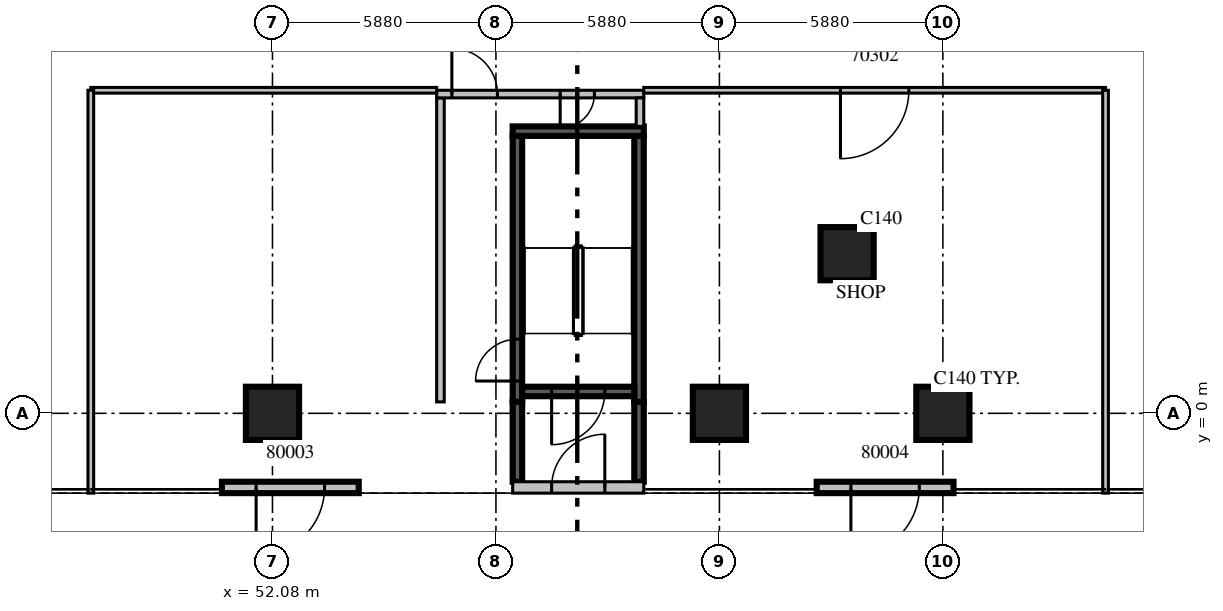
"""IFC4 building model, lengths in metres.
Left out: names, types, materials, properties, quantities, classifications, styles, units other than length and angle.
Written with IfcOpenShell. Run it as: python <this file> out.ifc"""

import sys

from ifc_helpers import new_model, si_unit, direction, frame, frame_2d, origin, origin_2d, place, context, subcontext, project, spatial, rectangle, extrude, source, transform, mapped, element, fill, save


model = new_model("IFC4")
c1 = context("Model", 3, precision=1e-05, world=origin(), true_north=direction((0.0, 1.0)))
c2 = subcontext(c1, "Body", "Model", "MODEL_VIEW")
j1 = project(units=[si_unit("LENGTHUNIT", "METRE"), si_unit("PLANEANGLEUNIT", "RADIAN")], contexts=[c1])
p1 = place(None, origin())
s1 = spatial("IfcSite", under=j1, at=p1, CompositionType="ELEMENT")
p2 = place(p1, origin())
s2 = spatial("IfcBuilding", under=s1, at=p2, CompositionType="ELEMENT")
p3 = place(p2, origin())
s3 = spatial("IfcBuildingStorey", under=s2, at=p3, CompositionType="ELEMENT", Elevation=0.0)
m1 = source(origin(), c2, "Body", "SweptSolid", [
    extrude(rectangle(XDim=1.4, YDim=1.4, at=origin_2d()), origin(), (0.0, 0.0, 1.0), 7.5),
])
for number, where, z_axis, x_axis in (
    (1, (52.08, 0.0, 0.0), (0.0, 0.0, 1.0), (1.0, 0.0, 0.0)),
    (2, (63.84, 0.0, 0.0), (0.0, 0.0, 1.0), (1.0, 0.0, 0.0)),
    (3, (67.2, 4.2, 0.0), (0.0, 0.0, 1.0), (1.0, 0.0, 0.0)),
    (4, (69.72, 0.0, 0.0), (0.0, 0.0, 1.0), (1.0, 0.0, 0.0)),
):
    element("IfcColumn", number, at=place(p3, frame(where, z_axis=z_axis, x_axis=x_axis)), inside=s3, PredefinedType="COLUMN", context=c2, shape_type="MappedRepresentation", body=[
        mapped(m1, transform((0.0, 0.0, 0.0), scale=1.0)),
    ])
m2 = source(origin(), c2, "Body", "SweptSolid", [
    extrude(rectangle(XDim=3.6, YDim=0.3, at=frame_2d((1.8, 0.0))), origin(), (0.0, 0.0, 1.0), 6.9),
])
p4 = place(p3, frame((50.75, -1.95, 0.0), z_axis=(0.0, 0.0, 1.0), x_axis=(1.0, 0.0, 0.0)))
e5 = element("IfcWall", 5, at=p4, inside=s3, PredefinedType="STANDARD", context=c2, shape_type="MappedRepresentation", body=[
    mapped(m2, transform((0.0, 0.0, 0.0), scale=1.0)),
])
m3 = source(origin(), c2, "Body", "SweptSolid", [
    extrude(rectangle(XDim=1.8, YDim=2.4, at=frame_2d((0.9, 1.2))), frame((0.0, 0.16, 0.0), z_axis=(0.0, -1.0, 0.0), x_axis=(1.0, 0.0, 0.0)), (0.0, 0.0, 1.0), 0.32),
])
p5 = place(p4, frame((0.9, 0.0, 0.0)))
e6 = element("IfcOpeningElement", 6, at=p5, cuts=e5, PredefinedType="OPENING", context=c2, shape_type="MappedRepresentation", body=[
    mapped(m3, transform((0.0, 0.0, 0.0), scale=1.0)),
])
p6 = place(p3, frame((66.4, -1.95, 0.0), z_axis=(0.0, 0.0, 1.0), x_axis=(1.0, 0.0, 0.0)))
e7 = element("IfcWall", 7, at=p6, inside=s3, PredefinedType="STANDARD", context=c2, shape_type="MappedRepresentation", body=[
    mapped(m2, transform((0.0, 0.0, 0.0), scale=1.0)),
])
p7 = place(p6, frame((0.9, 0.0, 0.0)))
e8 = element("IfcOpeningElement", 8, at=p7, cuts=e7, PredefinedType="OPENING", context=c2, shape_type="MappedRepresentation", body=[
    mapped(m3, transform((0.0, 0.0, 0.0), scale=1.0)),
])
m4 = source(origin(), c2, "Body", "SweptSolid", [
    extrude(rectangle(XDim=7.0, YDim=0.25, at=frame_2d((3.5, 0.0))), origin(), (0.0, 0.0, 1.0), 6.9),
])
p8 = place(p3, frame((58.525, 0.3, 0.0), z_axis=(0.0, 0.0, 1.0), x_axis=(0.0, 1.0, 0.0)))
e9 = element("IfcWall", 9, at=p8, inside=s3, PredefinedType="SOLIDWALL", context=c2, shape_type="MappedRepresentation", body=[
    mapped(m4, transform((0.0, 0.0, 0.0), scale=1.0)),
])
m5 = source(origin(), c2, "Body", "SweptSolid", [
    extrude(rectangle(XDim=1.1, YDim=2.1, at=frame_2d((0.55, 1.05))), frame((0.0, 0.135, 0.0), z_axis=(0.0, -1.0, 0.0), x_axis=(1.0, 0.0, 0.0)), (0.0, 0.0, 1.0), 0.27),
])
p9 = place(p8, frame((0.55, 0.0, 0.0)))
e10 = element("IfcOpeningElement", 10, at=p9, cuts=e9, PredefinedType="OPENING", context=c2, shape_type="MappedRepresentation", body=[
    mapped(m5, transform((0.0, 0.0, 0.0), scale=1.0)),
])
p10 = place(p3, frame((61.725, 0.3, 0.0), z_axis=(0.0, 0.0, 1.0), x_axis=(0.0, 1.0, 0.0)))
e11 = element("IfcWall", 11, at=p10, inside=s3, PredefinedType="SOLIDWALL", context=c2, shape_type="MappedRepresentation", body=[
    mapped(m4, transform((0.0, 0.0, 0.0), scale=1.0)),
])
m6 = source(origin(), c2, "Body", "SweptSolid", [
    extrude(rectangle(XDim=3.45, YDim=0.25, at=frame_2d((1.725, 0.0))), origin(), (0.0, 0.0, 1.0), 6.9),
])
p11 = place(p3, frame((58.4, 7.425, 0.0), z_axis=(0.0, 0.0, 1.0), x_axis=(1.0, 0.0, 0.0)))
e12 = element("IfcWall", 12, at=p11, inside=s3, PredefinedType="SOLIDWALL", context=c2, shape_type="MappedRepresentation", body=[
    mapped(m6, transform((0.0, 0.0, 0.0), scale=1.0)),
])
m7 = source(origin(), c2, "Body", "SweptSolid", [
    extrude(rectangle(XDim=2.95, YDim=0.25, at=frame_2d((1.475, 0.0))), origin(), (0.0, 0.0, 1.0), 6.9),
])
p12 = place(p3, frame((58.65, 0.575, 0.0), z_axis=(0.0, 0.0, 1.0), x_axis=(1.0, 0.0, 0.0)))
e13 = element("IfcWall", 13, at=p12, inside=s3, PredefinedType="SOLIDWALL", context=c2, shape_type="MappedRepresentation", body=[
    mapped(m7, transform((0.0, 0.0, 0.0), scale=1.0)),
])
m8 = source(origin(), c2, "Body", "SweptSolid", [
    extrude(rectangle(XDim=1.4, YDim=2.1, at=frame_2d((0.7, 1.05))), frame((0.0, 0.135, 0.0), z_axis=(0.0, -1.0, 0.0), x_axis=(1.0, 0.0, 0.0)), (0.0, 0.0, 1.0), 0.27),
])
p13 = place(p12, frame((0.775, 0.0, 0.0)))
e14 = element("IfcOpeningElement", 14, at=p13, cuts=e13, PredefinedType="OPENING", context=c2, shape_type="MappedRepresentation", body=[
    mapped(m8, transform((0.0, 0.0, 0.0), scale=1.0)),
])
m9 = source(origin(), c2, "Body", "SweptSolid", [
    extrude(rectangle(XDim=8.0, YDim=0.2, at=frame_2d((4.0, 0.0))), origin(), (0.0, 0.0, 1.0), 6.9),
])
p14 = place(p3, frame((56.5, 0.3, 0.0), z_axis=(0.0, 0.0, 1.0), x_axis=(0.0, 1.0, 0.0)))
e15 = element("IfcWall", 15, at=p14, inside=s3, PredefinedType="PARTITIONING", context=c2, shape_type="MappedRepresentation", body=[
    mapped(m9, transform((0.0, 0.0, 0.0), scale=1.0)),
])
m10 = source(origin(), c2, "Body", "SweptSolid", [
    extrude(rectangle(XDim=5.45, YDim=0.2, at=frame_2d((2.725, 0.0))), origin(), (0.0, 0.0, 1.0), 6.9),
])
p15 = place(p3, frame((56.4, 8.4, 0.0), z_axis=(0.0, 0.0, 1.0), x_axis=(1.0, 0.0, 0.0)))
e16 = element("IfcWall", 16, at=p15, inside=s3, PredefinedType="PARTITIONING", context=c2, shape_type="MappedRepresentation", body=[
    mapped(m10, transform((0.0, 0.0, 0.0), scale=1.0)),
])
m11 = source(origin(), c2, "Body", "SweptSolid", [
    extrude(rectangle(XDim=1.2, YDim=2.1, at=frame_2d((0.6, 1.05))), frame((0.0, 0.11, 0.0), z_axis=(0.0, -1.0, 0.0), x_axis=(1.0, 0.0, 0.0)), (0.0, 0.0, 1.0), 0.22),
])
p16 = place(p15, frame((0.4, 0.0, 0.0)))
e17 = element("IfcOpeningElement", 17, at=p16, cuts=e16, PredefinedType="OPENING", context=c2, shape_type="MappedRepresentation", body=[
    mapped(m11, transform((0.0, 0.0, 0.0), scale=1.0)),
])
m12 = source(origin(), c2, "Body", "SweptSolid", [
    extrude(rectangle(XDim=0.9, YDim=2.1, at=frame_2d((0.45, 1.05))), frame((0.0, 0.11, 0.0), z_axis=(0.0, -1.0, 0.0), x_axis=(1.0, 0.0, 0.0)), (0.0, 0.0, 1.0), 0.22),
])
p17 = place(p15, frame((3.25, 0.0, 0.0)))
e18 = element("IfcOpeningElement", 18, at=p17, cuts=e16, PredefinedType="OPENING", context=c2, shape_type="MappedRepresentation", body=[
    mapped(m12, transform((0.0, 0.0, 0.0), scale=1.0)),
])
m13 = source(origin(), c2, "Body", "SweptSolid", [
    extrude(rectangle(XDim=0.75, YDim=0.2, at=frame_2d((0.375, 0.0))), origin(), (0.0, 0.0, 1.0), 6.9),
])
p18 = place(p3, frame((61.75, 7.55, 0.0), z_axis=(0.0, 0.0, 1.0), x_axis=(0.0, 1.0, 0.0)))
e19 = element("IfcWall", 19, at=p18, inside=s3, PredefinedType="PARTITIONING", context=c2, shape_type="MappedRepresentation", body=[
    mapped(m13, transform((0.0, 0.0, 0.0), scale=1.0)),
])
m14 = source(origin(), c2, "Body", "SweptSolid", [
    extrude(rectangle(XDim=2.1, YDim=0.25, at=frame_2d((1.05, 0.0))), origin(), (0.0, 0.0, 1.0), 6.9),
])
for number, where, z_axis, x_axis in (
    (20, (58.525, -1.8, 0.0), (0.0, 0.0, 1.0), (0.0, 1.0, 0.0)),
    (21, (61.725, -1.8, 0.0), (0.0, 0.0, 1.0), (0.0, 1.0, 0.0)),
):
    element("IfcWall", number, at=place(p3, frame(where, z_axis=z_axis, x_axis=x_axis)), inside=s3, PredefinedType="SOLIDWALL", context=c2, shape_type="MappedRepresentation", body=[
        mapped(m14, transform((0.0, 0.0, 0.0), scale=1.0)),
    ])
m15 = source(origin(), c2, "Body", "SweptSolid", [
    extrude(rectangle(XDim=3.45, YDim=0.3, at=frame_2d((1.725, 0.0))), origin(), (0.0, 0.0, 1.0), 6.9),
])
p19 = place(p3, frame((61.85, -1.95, 0.0), z_axis=(0.0, 0.0, 1.0), x_axis=(-1.0, 0.0, 0.0)))
e22 = element("IfcWall", 22, at=p19, inside=s3, PredefinedType="PARTITIONING", context=c2, shape_type="MappedRepresentation", body=[
    mapped(m15, transform((0.0, 0.0, 0.0), scale=1.0)),
])
m16 = source(origin(), c2, "Body", "SweptSolid", [
    extrude(rectangle(XDim=1.4, YDim=2.1, at=frame_2d((0.7, 1.05))), frame((0.0, 0.16, 0.0), z_axis=(0.0, -1.0, 0.0), x_axis=(1.0, 0.0, 0.0)), (0.0, 0.0, 1.0), 0.32),
])
p20 = place(p19, frame((1.025, 0.0, 0.0)))
e23 = element("IfcOpeningElement", 23, at=p20, cuts=e22, PredefinedType="OPENING", context=c2, shape_type="MappedRepresentation", body=[
    mapped(m16, transform((0.0, 0.0, 0.0), scale=1.0)),
])
p21 = place(p3, frame((47.3, 8.5, 0.0), z_axis=(0.0, 0.0, 1.0), x_axis=(1.0, 0.0, 0.0)))
e24 = element("IfcWall", 24, at=p21, inside=s3, PredefinedType="PARTITIONING", context=c2, shape_type="SweptSolid", body=[
    extrude(rectangle(XDim=9.1, YDim=0.15, at=frame_2d((4.55, 0.0))), origin(), (0.0, 0.0, 1.0), 6.9),
])
p22 = place(p3, frame((61.85, 8.5, 0.0), z_axis=(0.0, 0.0, 1.0), x_axis=(1.0, 0.0, 0.0)))
e25 = element("IfcWall", 25, at=p22, inside=s3, PredefinedType="PARTITIONING", context=c2, shape_type="SweptSolid", body=[
    extrude(rectangle(XDim=12.15, YDim=0.15, at=frame_2d((6.075, 0.0))), origin(), (0.0, 0.0, 1.0), 6.9),
])
m17 = source(origin(), c2, "Body", "SweptSolid", [
    extrude(rectangle(XDim=1.8, YDim=2.1, at=frame_2d((0.9, 1.05))), frame((0.0, 0.085, 0.0), z_axis=(0.0, -1.0, 0.0), x_axis=(1.0, 0.0, 0.0)), (0.0, 0.0, 1.0), 0.17),
])
p23 = place(p22, frame((5.175, 0.0, 0.0)))
e26 = element("IfcOpeningElement", 26, at=p23, cuts=e25, PredefinedType="OPENING", context=c2, shape_type="MappedRepresentation", body=[
    mapped(m17, transform((0.0, 0.0, 0.0), scale=1.0)),
])
m18 = source(origin(), c2, "Body", "SweptSolid", [
    extrude(rectangle(XDim=10.6, YDim=0.15, at=frame_2d((5.3, 0.0))), origin(), (0.0, 0.0, 1.0), 6.9),
])
for number, where, z_axis, x_axis in (
    (27, (47.3, -2.1, 0.0), (0.0, 0.0, 1.0), (0.0, 1.0, 0.0)),
    (28, (74.0, -2.1, 0.0), (0.0, 0.0, 1.0), (0.0, 1.0, 0.0)),
):
    element("IfcWall", number, at=place(p3, frame(where, z_axis=z_axis, x_axis=x_axis)), inside=s3, PredefinedType="PARTITIONING", context=c2, shape_type="MappedRepresentation", body=[
        mapped(m18, transform((0.0, 0.0, 0.0), scale=1.0)),
    ])
m19 = source(origin(), c2, "Body", "SweptSolid", [
    extrude(rectangle(XDim=1.8, YDim=2.4, at=frame_2d((0.9, 1.2))), frame((0.0, 0.025, 0.0), z_axis=(0.0, -1.0, 0.0), x_axis=(1.0, 0.0, 0.0)), (0.0, 0.0, 1.0), 0.05),
])
p24 = place(p5, origin())
e29 = element("IfcDoor", 29, at=p24, inside=s3, OperationType="DOUBLE_DOOR_SINGLE_SWING", PredefinedType="DOOR", context=c2, shape_type="MappedRepresentation", body=[
    mapped(m19, transform((0.0, 0.0, 0.0), scale=1.0)),
])
fill(e6, e29)
p25 = place(p7, origin())
e30 = element("IfcDoor", 30, at=p25, inside=s3, OperationType="DOUBLE_DOOR_SINGLE_SWING", PredefinedType="DOOR", context=c2, shape_type="MappedRepresentation", body=[
    mapped(m19, transform((0.0, 0.0, 0.0), scale=1.0)),
])
fill(e8, e30)
m20 = source(origin(), c2, "Body", "SweptSolid", [
    extrude(rectangle(XDim=1.1, YDim=2.1, at=frame_2d((0.55, 1.05))), frame((0.0, 0.025, 0.0), z_axis=(0.0, -1.0, 0.0), x_axis=(1.0, 0.0, 0.0)), (0.0, 0.0, 1.0), 0.05),
])
p26 = place(p9, origin())
e31 = element("IfcDoor", 31, at=p26, inside=s3, OperationType="SINGLE_SWING_LEFT", PredefinedType="DOOR", context=c2, shape_type="MappedRepresentation", body=[
    mapped(m20, transform((0.0, 0.0, 0.0), scale=1.0)),
])
fill(e10, e31)
m21 = source(origin(), c2, "Body", "SweptSolid", [
    extrude(rectangle(XDim=1.4, YDim=2.1, at=frame_2d((0.7, 1.05))), frame((0.0, 0.025, 0.0), z_axis=(0.0, -1.0, 0.0), x_axis=(1.0, 0.0, 0.0)), (0.0, 0.0, 1.0), 0.05),
])
p27 = place(p13, origin())
e32 = element("IfcDoor", 32, at=p27, inside=s3, OperationType="DOUBLE_DOOR_SINGLE_SWING", PredefinedType="DOOR", context=c2, shape_type="MappedRepresentation", body=[
    mapped(m21, transform((0.0, 0.0, 0.0), scale=1.0)),
])
fill(e14, e32)
m22 = source(origin(), c2, "Body", "SweptSolid", [
    extrude(rectangle(XDim=1.2, YDim=2.1, at=frame_2d((0.6, 1.05))), frame((0.0, 0.025, 0.0), z_axis=(0.0, -1.0, 0.0), x_axis=(1.0, 0.0, 0.0)), (0.0, 0.0, 1.0), 0.05),
])
p28 = place(p16, origin())
e33 = element("IfcDoor", 33, at=p28, inside=s3, OperationType="SINGLE_SWING_LEFT", PredefinedType="DOOR", context=c2, shape_type="MappedRepresentation", body=[
    mapped(m22, transform((0.0, 0.0, 0.0), scale=1.0)),
])
fill(e17, e33)
m23 = source(origin(), c2, "Body", "SweptSolid", [
    extrude(rectangle(XDim=0.9, YDim=2.1, at=frame_2d((0.45, 1.05))), frame((0.0, 0.025, 0.0), z_axis=(0.0, -1.0, 0.0), x_axis=(1.0, 0.0, 0.0)), (0.0, 0.0, 1.0), 0.05),
])
p29 = place(p17, origin())
e34 = element("IfcDoor", 34, at=p29, inside=s3, OperationType="SINGLE_SWING_RIGHT", PredefinedType="DOOR", context=c2, shape_type="MappedRepresentation", body=[
    mapped(m23, transform((0.0, 0.0, 0.0), scale=1.0)),
])
fill(e18, e34)
p30 = place(p20, origin())
e35 = element("IfcDoor", 35, at=p30, inside=s3, OperationType="DOUBLE_DOOR_SINGLE_SWING", PredefinedType="DOOR", context=c2, shape_type="MappedRepresentation", body=[
    mapped(m21, transform((0.0, 0.0, 0.0), scale=1.0)),
])
fill(e23, e35)
m24 = source(origin(), c2, "Body", "SweptSolid", [
    extrude(rectangle(XDim=1.8, YDim=2.1, at=frame_2d((0.9, 1.05))), frame((0.0, 0.025, 0.0), z_axis=(0.0, -1.0, 0.0), x_axis=(1.0, 0.0, 0.0)), (0.0, 0.0, 1.0), 0.05),
])
p31 = place(p23, origin())
e36 = element("IfcDoor", 36, at=p31, inside=s3, OperationType="DOUBLE_DOOR_SINGLE_SWING", PredefinedType="DOOR", context=c2, shape_type="MappedRepresentation", body=[
    mapped(m24, transform((0.0, 0.0, 0.0), scale=1.0)),
])
fill(e26, e36)
save(model, sys.argv[1])
